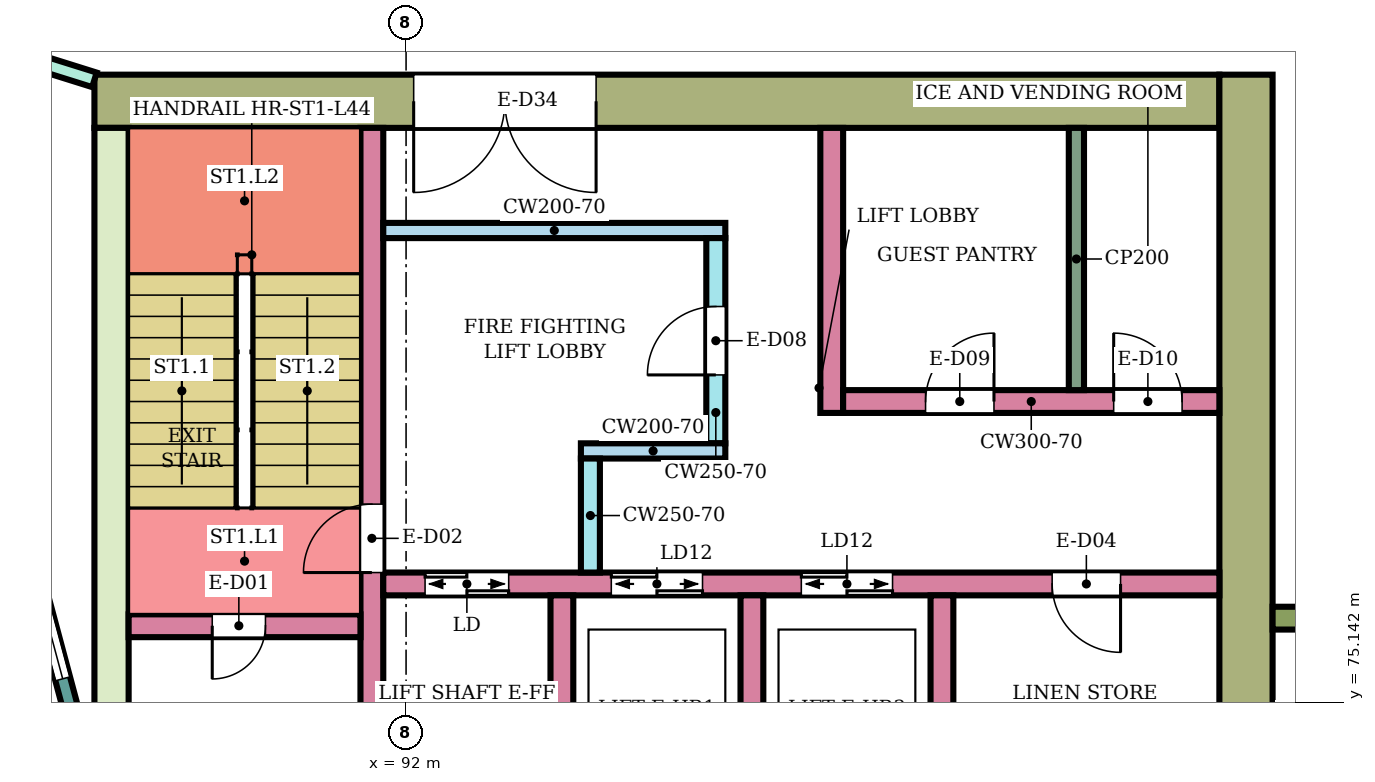
"""IFC4 building model, lengths in metres.
Left out: names, types, materials, properties, quantities, classifications, styles, units other than length and angle.
Written with IfcOpenShell. Run it as: python <this file> out.ifc"""

import sys

from ifc_helpers import new_model, si_unit, direction, frame, frame_2d, origin, place, context, subcontext, project, spatial, rectangle, extrude, element, fill, save


model = new_model("IFC4")
c1 = context("Model", 3, precision=1e-05, world=origin(), true_north=direction((0.0, 1.0)))
c2 = subcontext(c1, "Body", "Model", "MODEL_VIEW")
j1 = project(units=[si_unit("LENGTHUNIT", "METRE"), si_unit("PLANEANGLEUNIT", "RADIAN")], contexts=[c1])
p1 = place(None, origin())
s1 = spatial("IfcSite", under=j1, at=p1, CompositionType="ELEMENT")
p2 = place(p1, origin())
s2 = spatial("IfcBuilding", under=s1, at=p2, CompositionType="ELEMENT")
p3 = place(p2, frame((0.0, 0.0, 190.5)))
s3 = spatial("IfcBuildingStorey", under=s2, at=p3, CompositionType="ELEMENT", Elevation=190.5)
p4 = place(p3, frame((87.9, 83.05, 0.0), z_axis=(0.0, 0.0, 1.0), x_axis=(1.0, 0.0, 0.0)))
e1 = element("IfcWall", 1, at=p4, inside=s3, PredefinedType="SHEAR", context=c2, shape_type="SweptSolid", body=[
    extrude(rectangle(XDim=14.8, YDim=0.7, at=frame_2d((7.4, 0.0))), origin(), (0.0, 0.0, 1.0), 3.78),
])
p5 = place(p4, frame((4.2, 0.0, 0.0)))
e2 = element("IfcOpeningElement", 2, at=p5, cuts=e1, PredefinedType="OPENING", context=c2, shape_type="SweptSolid", body=[
    extrude(rectangle(XDim=2.4, YDim=2.4, at=frame_2d((1.2, 1.2))), frame((0.0, 0.36, 0.0), z_axis=(0.0, -1.0, 0.0), x_axis=(1.0, 0.0, 0.0)), (0.0, 0.0, 1.0), 0.72),
])
p6 = place(p3, frame((88.125, 75.0, 0.0), z_axis=(0.0, 0.0, 1.0), x_axis=(0.0, 1.0, 0.0)))
e3 = element("IfcWall", 3, at=p6, inside=s3, PredefinedType="SHEAR", context=c2, shape_type="SweptSolid", body=[
    extrude(rectangle(XDim=7.7, YDim=0.45, at=frame_2d((3.85, 0.0))), origin(), (0.0, 0.0, 1.0), 3.78),
])
p7 = place(p3, frame((103.05, 66.6, 0.0), z_axis=(0.0, 0.0, 1.0), x_axis=(0.0, 1.0, 0.0)))
e4 = element("IfcWall", 4, at=p7, inside=s3, PredefinedType="SHEAR", context=c2, shape_type="SweptSolid", body=[
    extrude(rectangle(XDim=16.8, YDim=0.7, at=frame_2d((8.4, 0.0))), origin(), (0.0, 0.0, 1.0), 3.78),
])
p8 = place(p3, frame((91.55, 75.0, 0.0), z_axis=(0.0, 0.0, 1.0), x_axis=(0.0, 1.0, 0.0)))
e5 = element("IfcWall", 5, at=p8, inside=s3, PredefinedType="SHEAR", context=c2, shape_type="SweptSolid", body=[
    extrude(rectangle(XDim=7.7, YDim=0.3, at=frame_2d((3.85, 0.0))), origin(), (0.0, 0.0, 1.0), 3.78),
])
p9 = place(p8, frame((1.85, 0.0, 0.0)))
e6 = element("IfcOpeningElement", 6, at=p9, cuts=e5, PredefinedType="OPENING", context=c2, shape_type="SweptSolid", body=[
    extrude(rectangle(XDim=0.9, YDim=2.1, at=frame_2d((0.45, 1.05))), frame((0.0, 0.16, 0.0), z_axis=(0.0, -1.0, 0.0), x_axis=(1.0, 0.0, 0.0)), (0.0, 0.0, 1.0), 0.32),
])
p10 = place(p3, frame((88.35, 76.15, 0.0), z_axis=(0.0, 0.0, 1.0), x_axis=(1.0, 0.0, 0.0)))
e7 = element("IfcWall", 7, at=p10, inside=s3, PredefinedType="SHEAR", context=c2, shape_type="SweptSolid", body=[
    extrude(rectangle(XDim=3.05, YDim=0.3, at=frame_2d((1.525, 0.0))), origin(), (0.0, 0.0, 1.0), 3.78),
])
p11 = place(p10, frame((1.1, 0.0, 0.0)))
e8 = element("IfcOpeningElement", 8, at=p11, cuts=e7, PredefinedType="OPENING", context=c2, shape_type="SweptSolid", body=[
    extrude(rectangle(XDim=0.7, YDim=2.0, at=frame_2d((0.35, 1.0))), frame((0.0, 0.16, 0.0), z_axis=(0.0, -1.0, 0.0), x_axis=(1.0, 0.0, 0.0)), (0.0, 0.0, 1.0), 0.32),
])
p12 = place(p3, frame((91.7, 76.7, 0.0), z_axis=(0.0, 0.0, 1.0), x_axis=(1.0, 0.0, 0.0)))
e9 = element("IfcWall", 9, at=p12, inside=s3, PredefinedType="SHEAR", context=c2, shape_type="SweptSolid", body=[
    extrude(rectangle(XDim=11.0, YDim=0.3, at=frame_2d((5.5, 0.0))), origin(), (0.0, 0.0, 1.0), 3.78),
])
p13 = place(p12, frame((0.55, 0.0, 0.0)))
e10 = element("IfcOpeningElement", 10, at=p13, cuts=e9, PredefinedType="OPENING", context=c2, shape_type="SweptSolid", body=[
    extrude(rectangle(XDim=1.1, YDim=2.1, at=frame_2d((0.55, 1.05))), frame((0.0, 0.16, 0.0), z_axis=(0.0, -1.0, 0.0), x_axis=(1.0, 0.0, 0.0)), (0.0, 0.0, 1.0), 0.32),
])
p14 = place(p12, frame((3.0, 0.0, 0.0)))
e11 = element("IfcOpeningElement", 11, at=p14, cuts=e9, PredefinedType="OPENING", context=c2, shape_type="SweptSolid", body=[
    extrude(rectangle(XDim=1.2, YDim=2.1, at=frame_2d((0.6, 1.05))), frame((0.0, 0.16, 0.0), z_axis=(0.0, -1.0, 0.0), x_axis=(1.0, 0.0, 0.0)), (0.0, 0.0, 1.0), 0.32),
])
p15 = place(p12, frame((5.5, 0.0, 0.0)))
e12 = element("IfcOpeningElement", 12, at=p15, cuts=e9, PredefinedType="OPENING", context=c2, shape_type="SweptSolid", body=[
    extrude(rectangle(XDim=1.2, YDim=2.1, at=frame_2d((0.6, 1.05))), frame((0.0, 0.16, 0.0), z_axis=(0.0, -1.0, 0.0), x_axis=(1.0, 0.0, 0.0)), (0.0, 0.0, 1.0), 0.32),
])
p16 = place(p12, frame((8.8, 0.0, 0.0)))
e13 = element("IfcOpeningElement", 13, at=p16, cuts=e9, PredefinedType="OPENING", context=c2, shape_type="SweptSolid", body=[
    extrude(rectangle(XDim=0.9, YDim=2.1, at=frame_2d((0.45, 1.05))), frame((0.0, 0.16, 0.0), z_axis=(0.0, -1.0, 0.0), x_axis=(1.0, 0.0, 0.0)), (0.0, 0.0, 1.0), 0.32),
])
for number, where, z_axis, x_axis in (
    (14, (94.05, 74.0, 0.0), (0.0, 0.0, 1.0), (0.0, 1.0, 0.0)),
    (15, (96.55, 74.0, 0.0), (0.0, 0.0, 1.0), (0.0, 1.0, 0.0)),
    (16, (99.05, 74.0, 0.0), (0.0, 0.0, 1.0), (0.0, 1.0, 0.0)),
):
    element("IfcWall", number, at=place(p3, frame(where, z_axis=z_axis, x_axis=x_axis)), inside=s3, PredefinedType="SHEAR", context=c2, shape_type="SweptSolid", body=[
        extrude(rectangle(XDim=2.55, YDim=0.3, at=frame_2d((1.275, 0.0))), origin(), (0.0, 0.0, 1.0), 3.78),
    ])
p17 = place(p3, frame((91.7, 81.35, 0.0), z_axis=(0.0, 0.0, 1.0), x_axis=(1.0, 0.0, 0.0)))
e17 = element("IfcWall", 17, at=p17, inside=s3, PredefinedType="SHEAR", context=c2, shape_type="SweptSolid", body=[
    extrude(rectangle(XDim=4.5, YDim=0.2, at=frame_2d((2.25, 0.0))), origin(), (0.0, 0.0, 1.0), 3.78),
])
p18 = place(p3, frame((96.075, 78.55, 0.0), z_axis=(0.0, 0.0, 1.0), x_axis=(0.0, 1.0, 0.0)))
e18 = element("IfcWall", 18, at=p18, inside=s3, PredefinedType="SHEAR", context=c2, shape_type="SweptSolid", body=[
    extrude(rectangle(XDim=2.7, YDim=0.25, at=frame_2d((1.35, 0.0))), origin(), (0.0, 0.0, 1.0), 3.78),
])
p19 = place(p18, frame((0.9, 0.0, 0.0)))
e19 = element("IfcOpeningElement", 19, at=p19, cuts=e18, PredefinedType="OPENING", context=c2, shape_type="SweptSolid", body=[
    extrude(rectangle(XDim=0.9, YDim=2.1, at=frame_2d((0.45, 1.05))), frame((0.0, 0.135, 0.0), z_axis=(0.0, -1.0, 0.0), x_axis=(1.0, 0.0, 0.0)), (0.0, 0.0, 1.0), 0.27),
])
p20 = place(p3, frame((94.3, 78.45, 0.0), z_axis=(0.0, 0.0, 1.0), x_axis=(1.0, 0.0, 0.0)))
e20 = element("IfcWall", 20, at=p20, inside=s3, PredefinedType="SHEAR", context=c2, shape_type="SweptSolid", body=[
    extrude(rectangle(XDim=1.9, YDim=0.2, at=frame_2d((0.95, 0.0))), origin(), (0.0, 0.0, 1.0), 3.78),
])
p21 = place(p3, frame((94.425, 76.85, 0.0), z_axis=(0.0, 0.0, 1.0), x_axis=(0.0, 1.0, 0.0)))
e21 = element("IfcWall", 21, at=p21, inside=s3, PredefinedType="SHEAR", context=c2, shape_type="SweptSolid", body=[
    extrude(rectangle(XDim=1.5, YDim=0.25, at=frame_2d((0.75, 0.0))), origin(), (0.0, 0.0, 1.0), 3.78),
])
p22 = place(p3, frame((97.6, 78.95, 0.0), z_axis=(0.0, 0.0, 1.0), x_axis=(0.0, 1.0, 0.0)))
e22 = element("IfcWall", 22, at=p22, inside=s3, PredefinedType="SHEAR", context=c2, shape_type="SweptSolid", body=[
    extrude(rectangle(XDim=3.75, YDim=0.3, at=frame_2d((1.875, 0.0))), origin(), (0.0, 0.0, 1.0), 3.78),
])
p23 = place(p3, frame((97.75, 79.1, 0.0), z_axis=(0.0, 0.0, 1.0), x_axis=(1.0, 0.0, 0.0)))
e23 = element("IfcWall", 23, at=p23, inside=s3, PredefinedType="SHEAR", context=c2, shape_type="SweptSolid", body=[
    extrude(rectangle(XDim=4.95, YDim=0.3, at=frame_2d((2.475, 0.0))), origin(), (0.0, 0.0, 1.0), 3.78),
])
p24 = place(p23, frame((1.084, 0.0, 0.0)))
e24 = element("IfcOpeningElement", 24, at=p24, cuts=e23, PredefinedType="OPENING", context=c2, shape_type="SweptSolid", body=[
    extrude(rectangle(XDim=0.9, YDim=2.1, at=frame_2d((0.45, 1.05))), frame((0.0, 0.16, 0.0), z_axis=(0.0, -1.0, 0.0), x_axis=(1.0, 0.0, 0.0)), (0.0, 0.0, 1.0), 0.32),
])
p25 = place(p23, frame((3.56, 0.0, 0.0)))
e25 = element("IfcOpeningElement", 25, at=p25, cuts=e23, PredefinedType="OPENING", context=c2, shape_type="SweptSolid", body=[
    extrude(rectangle(XDim=0.9, YDim=2.1, at=frame_2d((0.45, 1.05))), frame((0.0, 0.16, 0.0), z_axis=(0.0, -1.0, 0.0), x_axis=(1.0, 0.0, 0.0)), (0.0, 0.0, 1.0), 0.32),
])
p26 = place(p3, frame((103.4, 76.25, 0.0), z_axis=(0.0, 0.0, 1.0), x_axis=(1.0, 0.0, 0.0)))
e26 = element("IfcWall", 26, at=p26, inside=s3, PredefinedType="NOTDEFINED", context=c2, shape_type="SweptSolid", body=[
    extrude(rectangle(XDim=2.416, YDim=0.3, at=frame_2d((1.208, 0.0))), origin(), (0.0, 0.0, 1.0), 4.1),
])
p27 = place(p3, frame((87.604, 75.0, 0.0), z_axis=(0.0, 0.0, 1.0), x_axis=(-0.258789828301, 0.965933654434, 0.0)))
e27 = element("IfcWall", 27, at=p27, inside=s3, PredefinedType="NOTDEFINED", context=c2, shape_type="SweptSolid", body=[
    extrude(rectangle(XDim=3.936, YDim=0.2, at=frame_2d((1.968, 0.0))), origin(), (0.0, 0.0, 1.0), 4.1),
])
p28 = place(p27, frame((0.468, 0.0, 0.9)))
e28 = element("IfcOpeningElement", 28, at=p28, cuts=e27, PredefinedType="OPENING", context=c2, shape_type="SweptSolid", body=[
    extrude(rectangle(XDim=3.0, YDim=2.3, at=frame_2d((1.5, 1.15))), frame((0.0, 0.11, 0.0), z_axis=(0.0, -1.0, 0.0), x_axis=(1.0, 0.0, 0.0)), (0.0, 0.0, 1.0), 0.22),
])
p29 = place(p3, frame((85.587, 84.057, 0.0), z_axis=(0.0, 0.0, 1.0), x_axis=(0.954239513179, -0.299043393987, 0.0)))
e29 = element("IfcWall", 29, at=p29, inside=s3, PredefinedType="PARTITIONING", context=c2, shape_type="SweptSolid", body=[
    extrude(rectangle(XDim=2.424, YDim=0.2, at=frame_2d((1.212, 0.0))), origin(), (0.0, 0.0, 1.0), 3.65),
])
p30 = place(p29, frame((0.762, 0.0, 0.0)))
e30 = element("IfcOpeningElement", 30, at=p30, cuts=e29, PredefinedType="OPENING", context=c2, shape_type="SweptSolid", body=[
    extrude(rectangle(XDim=0.9, YDim=2.1, at=frame_2d((0.45, 1.05))), frame((0.0, 0.11, 0.0), z_axis=(0.0, -1.0, 0.0), x_axis=(1.0, 0.0, 0.0)), (0.0, 0.0, 1.0), 0.22),
])
p31 = place(p3, frame((100.819, 79.25, 0.0), z_axis=(0.0, 0.0, 1.0), x_axis=(0.0, 1.0, 0.0)))
e31 = element("IfcWall", 31, at=p31, inside=s3, PredefinedType="PARTITIONING", context=c2, shape_type="SweptSolid", body=[
    extrude(rectangle(XDim=3.45, YDim=0.2, at=frame_2d((1.725, 0.0))), origin(), (0.0, 0.0, 1.0), 3.78),
])
p32 = place(p28, origin())
e32 = element("IfcWindow", 32, at=p32, inside=s3, PartitioningType="SINGLE_PANEL", PredefinedType="WINDOW", context=c2, shape_type="SweptSolid", body=[
    extrude(rectangle(XDim=3.0, YDim=2.3, at=frame_2d((1.5, 1.15))), frame((0.0, 0.03, 0.0), z_axis=(0.0, -1.0, 0.0), x_axis=(1.0, 0.0, 0.0)), (0.0, 0.0, 1.0), 0.06),
])
fill(e28, e32)
p33 = place(p11, frame((0.7, 0.0, 0.0), z_axis=(0.0, 0.0, 1.0), x_axis=(-1.0, 0.0, 0.0)))
e33 = element("IfcDoor", 33, at=p33, inside=s3, OperationType="SINGLE_SWING_RIGHT", PredefinedType="DOOR", context=c2, shape_type="SweptSolid", body=[
    extrude(rectangle(XDim=0.7, YDim=2.0, at=frame_2d((0.35, 1.0))), frame((0.0, 0.025, 0.0), z_axis=(0.0, -1.0, 0.0), x_axis=(1.0, 0.0, 0.0)), (0.0, 0.0, 1.0), 0.05),
])
fill(e8, e33)
p34 = place(p9, origin())
e34 = element("IfcDoor", 34, at=p34, inside=s3, OperationType="SINGLE_SWING_LEFT", PredefinedType="DOOR", context=c2, shape_type="SweptSolid", body=[
    extrude(rectangle(XDim=0.9, YDim=2.1, at=frame_2d((0.45, 1.05))), frame((0.0, 0.025, 0.0), z_axis=(0.0, -1.0, 0.0), x_axis=(1.0, 0.0, 0.0)), (0.0, 0.0, 1.0), 0.05),
])
fill(e6, e34)
p35 = place(p13, origin())
e35 = element("IfcDoor", 35, at=p35, inside=s3, OperationType="DOUBLE_DOOR_SLIDING", PredefinedType="DOOR", context=c2, shape_type="SweptSolid", body=[
    extrude(rectangle(XDim=1.1, YDim=2.1, at=frame_2d((0.55, 1.05))), frame((0.0, 0.025, 0.0), z_axis=(0.0, -1.0, 0.0), x_axis=(1.0, 0.0, 0.0)), (0.0, 0.0, 1.0), 0.05),
])
fill(e10, e35)
p36 = place(p14, origin())
e36 = element("IfcDoor", 36, at=p36, inside=s3, OperationType="DOUBLE_DOOR_SLIDING", PredefinedType="DOOR", context=c2, shape_type="SweptSolid", body=[
    extrude(rectangle(XDim=1.2, YDim=2.1, at=frame_2d((0.6, 1.05))), frame((0.0, 0.025, 0.0), z_axis=(0.0, -1.0, 0.0), x_axis=(1.0, 0.0, 0.0)), (0.0, 0.0, 1.0), 0.05),
])
fill(e11, e36)
p37 = place(p15, origin())
e37 = element("IfcDoor", 37, at=p37, inside=s3, OperationType="DOUBLE_DOOR_SLIDING", PredefinedType="DOOR", context=c2, shape_type="SweptSolid", body=[
    extrude(rectangle(XDim=1.2, YDim=2.1, at=frame_2d((0.6, 1.05))), frame((0.0, 0.025, 0.0), z_axis=(0.0, -1.0, 0.0), x_axis=(1.0, 0.0, 0.0)), (0.0, 0.0, 1.0), 0.05),
])
fill(e12, e37)
p38 = place(p16, frame((0.9, 0.0, 0.0), z_axis=(0.0, 0.0, 1.0), x_axis=(-1.0, 0.0, 0.0)))
e38 = element("IfcDoor", 38, at=p38, inside=s3, OperationType="SINGLE_SWING_LEFT", PredefinedType="DOOR", context=c2, shape_type="SweptSolid", body=[
    extrude(rectangle(XDim=0.9, YDim=2.1, at=frame_2d((0.45, 1.05))), frame((0.0, 0.025, 0.0), z_axis=(0.0, -1.0, 0.0), x_axis=(1.0, 0.0, 0.0)), (0.0, 0.0, 1.0), 0.05),
])
fill(e13, e38)
p39 = place(p19, origin())
e39 = element("IfcDoor", 39, at=p39, inside=s3, OperationType="SINGLE_SWING_LEFT", PredefinedType="DOOR", context=c2, shape_type="SweptSolid", body=[
    extrude(rectangle(XDim=0.9, YDim=2.1, at=frame_2d((0.45, 1.05))), frame((0.0, 0.025, 0.0), z_axis=(0.0, -1.0, 0.0), x_axis=(1.0, 0.0, 0.0)), (0.0, 0.0, 1.0), 0.05),
])
fill(e19, e39)
p40 = place(p24, origin())
e40 = element("IfcDoor", 40, at=p40, inside=s3, OperationType="SINGLE_SWING_RIGHT", PredefinedType="DOOR", context=c2, shape_type="SweptSolid", body=[
    extrude(rectangle(XDim=0.9, YDim=2.1, at=frame_2d((0.45, 1.05))), frame((0.0, 0.025, 0.0), z_axis=(0.0, -1.0, 0.0), x_axis=(1.0, 0.0, 0.0)), (0.0, 0.0, 1.0), 0.05),
])
fill(e24, e40)
p41 = place(p25, origin())
e41 = element("IfcDoor", 41, at=p41, inside=s3, OperationType="SINGLE_SWING_LEFT", PredefinedType="DOOR", context=c2, shape_type="SweptSolid", body=[
    extrude(rectangle(XDim=0.9, YDim=2.1, at=frame_2d((0.45, 1.05))), frame((0.0, 0.025, 0.0), z_axis=(0.0, -1.0, 0.0), x_axis=(1.0, 0.0, 0.0)), (0.0, 0.0, 1.0), 0.05),
])
fill(e25, e41)
p42 = place(p5, frame((2.4, 0.0, 0.0), z_axis=(0.0, 0.0, 1.0), x_axis=(-1.0, 0.0, 0.0)))
e42 = element("IfcDoor", 42, at=p42, inside=s3, OperationType="DOUBLE_DOOR_SINGLE_SWING", PredefinedType="DOOR", context=c2, shape_type="SweptSolid", body=[
    extrude(rectangle(XDim=2.4, YDim=2.4, at=frame_2d((1.2, 1.2))), frame((0.0, 0.025, 0.0), z_axis=(0.0, -1.0, 0.0), x_axis=(1.0, 0.0, 0.0)), (0.0, 0.0, 1.0), 0.05),
])
fill(e2, e42)
save(model, sys.argv[1])
